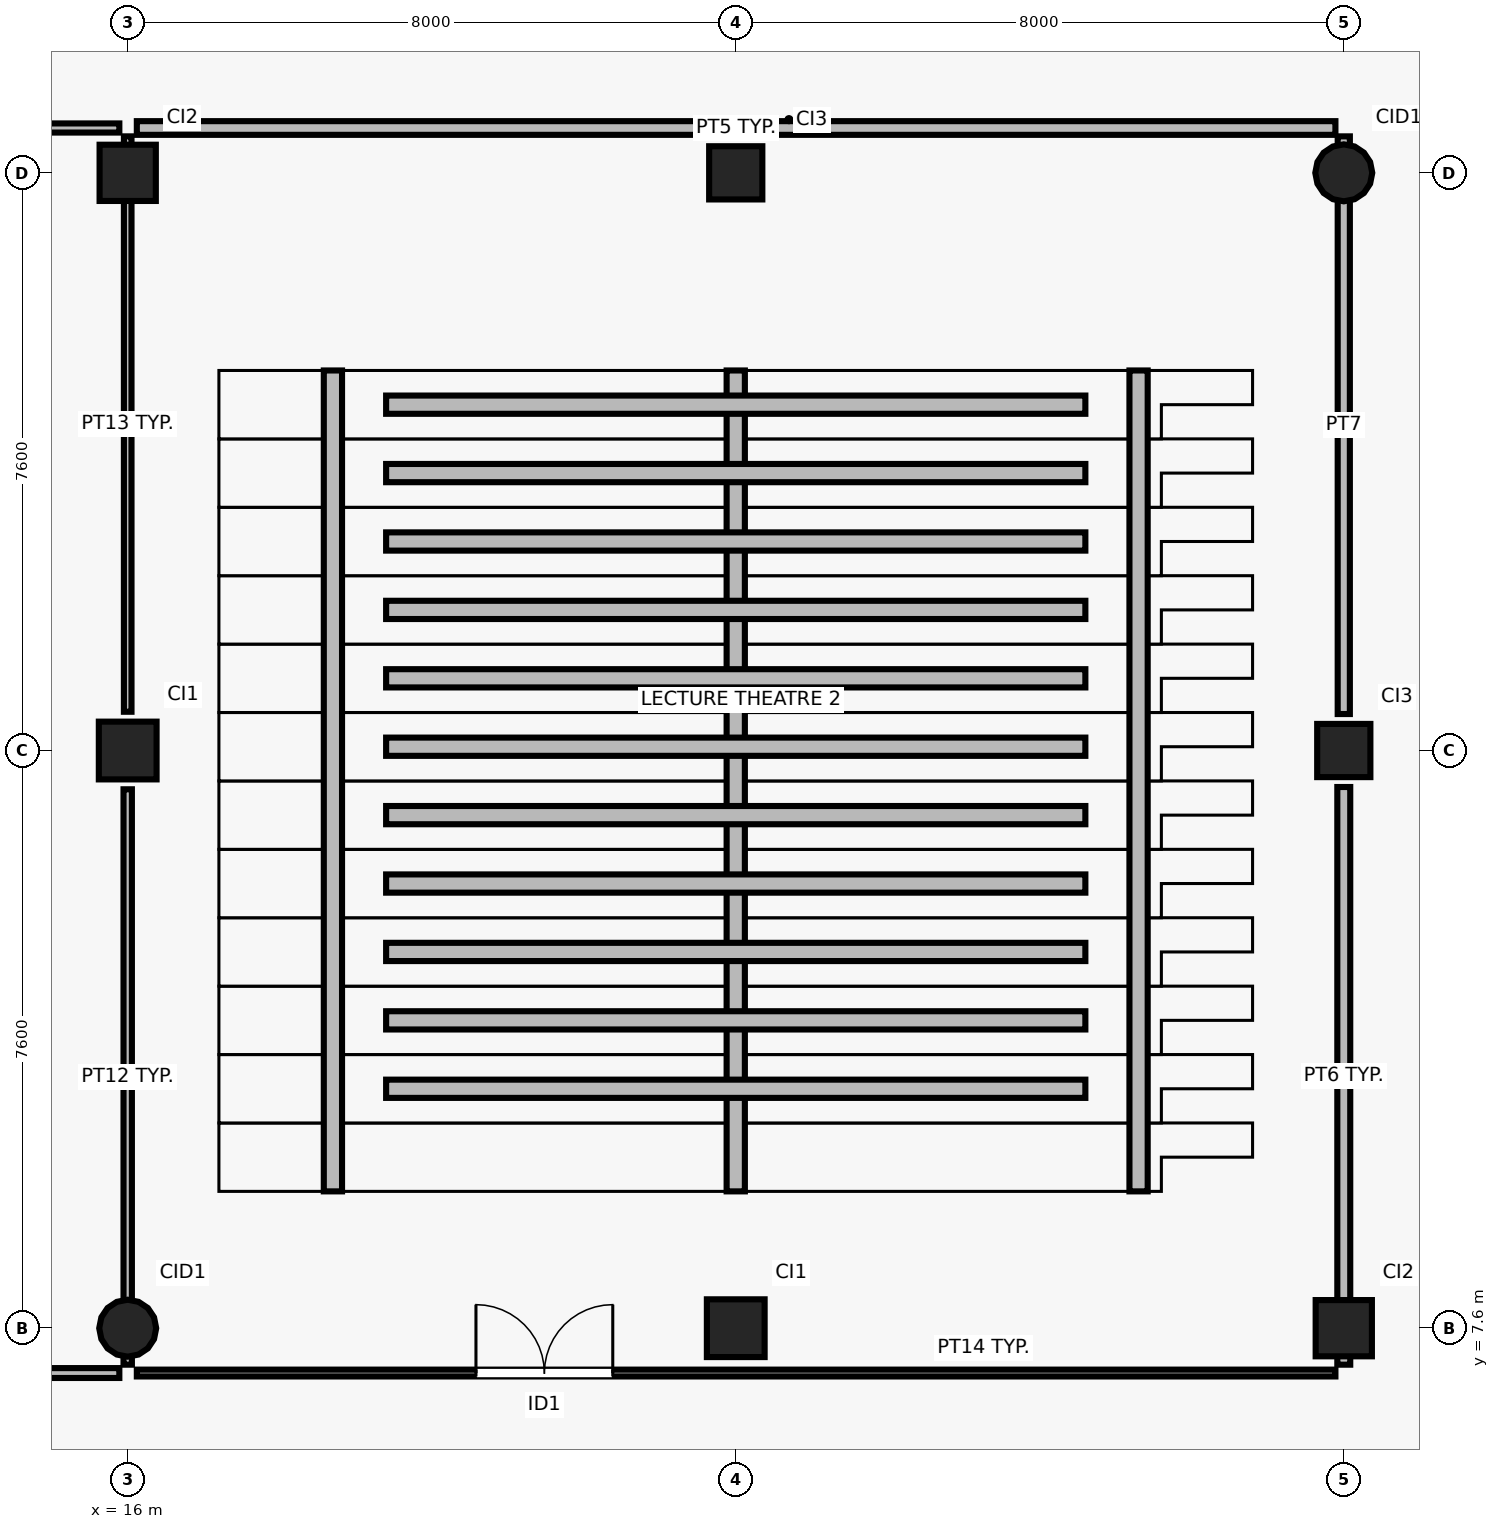
"""IFC4 building model, lengths in metres.
Left out: names, types, materials, properties, quantities, classifications, styles, units other than length and angle.
Written with IfcOpenShell. Run it as: python <this file> out.ifc"""

import sys

from ifc_helpers import new_model, si_unit, direction, frame, frame_2d, origin, origin_2d, place, context, subcontext, project, spatial, polyline, rectangle, circle, outline, extrude, element, fill, save


model = new_model("IFC4")
c1 = context("Model", 3, precision=1e-05, world=origin(), true_north=direction((0.0, 1.0)))
c2 = subcontext(c1, "Body", "Model", "MODEL_VIEW")
j1 = project(units=[si_unit("LENGTHUNIT", "METRE"), si_unit("PLANEANGLEUNIT", "RADIAN")], contexts=[c1])
p1 = place(None, origin())
s1 = spatial("IfcSite", under=j1, at=p1, CompositionType="ELEMENT")
p2 = place(p1, origin())
s2 = spatial("IfcBuilding", under=s1, at=p2, CompositionType="ELEMENT")
p3 = place(p2, origin())
s3 = spatial("IfcBuildingStorey", under=s2, at=p3, CompositionType="ELEMENT", Elevation=0.0)
p4 = place(p3, frame((16.0, 7.6, 0.0), z_axis=(0.0, 0.0, 1.0), x_axis=(1.0, 0.0, 0.0)))
e1 = element("IfcColumn", 1, at=p4, inside=s3, PredefinedType="COLUMN", context=c2, shape_type="SweptSolid", body=[
    extrude(circle(Radius=0.375, at=origin_2d()), origin(), (0.0, 0.0, 1.0), 4.5),
])
p5 = place(p3, frame((16.0, 15.2, 0.0), z_axis=(0.0, 0.0, 1.0), x_axis=(1.0, 0.0, 0.0)))
e2 = element("IfcColumn", 2, at=p5, inside=s3, PredefinedType="COLUMN", context=c2, shape_type="SweptSolid", body=[
    extrude(rectangle(XDim=0.76, YDim=0.76, at=origin_2d()), origin(), (0.0, 0.0, 1.0), 4.5),
])
p6 = place(p3, frame((16.0, 22.8, 0.0), z_axis=(0.0, 0.0, 1.0), x_axis=(1.0, 0.0, 0.0)))
e3 = element("IfcColumn", 3, at=p6, inside=s3, PredefinedType="COLUMN", context=c2, shape_type="SweptSolid", body=[
    extrude(rectangle(XDim=0.74, YDim=0.74, at=origin_2d()), origin(), (0.0, 0.0, 1.0), 4.5),
])
p7 = place(p3, frame((24.0, 7.6, 0.0), z_axis=(0.0, 0.0, 1.0), x_axis=(1.0, 0.0, 0.0)))
e4 = element("IfcColumn", 4, at=p7, inside=s3, PredefinedType="COLUMN", context=c2, shape_type="SweptSolid", body=[
    extrude(rectangle(XDim=0.76, YDim=0.76, at=origin_2d()), origin(), (0.0, 0.0, 1.0), 4.5),
])
p8 = place(p3, frame((24.0, 22.8, 0.0), z_axis=(0.0, 0.0, 1.0), x_axis=(1.0, 0.0, 0.0)))
e5 = element("IfcColumn", 5, at=p8, inside=s3, PredefinedType="COLUMN", context=c2, shape_type="SweptSolid", body=[
    extrude(rectangle(XDim=0.7, YDim=0.7, at=origin_2d()), origin(), (0.0, 0.0, 1.0), 4.5),
])
p9 = place(p3, frame((32.0, 7.6, 0.0), z_axis=(0.0, 0.0, 1.0), x_axis=(1.0, 0.0, 0.0)))
e6 = element("IfcColumn", 6, at=p9, inside=s3, PredefinedType="COLUMN", context=c2, shape_type="SweptSolid", body=[
    extrude(rectangle(XDim=0.74, YDim=0.74, at=origin_2d()), origin(), (0.0, 0.0, 1.0), 4.5),
])
p10 = place(p3, frame((32.0, 15.2, 0.0), z_axis=(0.0, 0.0, 1.0), x_axis=(1.0, 0.0, 0.0)))
e7 = element("IfcColumn", 7, at=p10, inside=s3, PredefinedType="COLUMN", context=c2, shape_type="SweptSolid", body=[
    extrude(rectangle(XDim=0.7, YDim=0.7, at=origin_2d()), origin(), (0.0, 0.0, 1.0), 4.5),
])
p11 = place(p3, frame((32.0, 22.8, 0.0), z_axis=(0.0, 0.0, 1.0), x_axis=(1.0, 0.0, 0.0)))
e8 = element("IfcColumn", 8, at=p11, inside=s3, PredefinedType="COLUMN", context=c2, shape_type="SweptSolid", body=[
    extrude(circle(Radius=0.375, at=origin_2d()), origin(), (0.0, 0.0, 1.0), 4.5),
])
for number, where, z_axis, x_axis in (
    (9, (18.7, 9.4, 0.0), (0.0, 0.0, 1.0), (0.0, 1.0, 0.0)),
    (10, (24.0, 9.4, 0.0), (0.0, 0.0, 1.0), (0.0, 1.0, 0.0)),
    (11, (29.3, 9.4, 0.0), (0.0, 0.0, 1.0), (0.0, 1.0, 0.0)),
):
    element("IfcWall", number, at=place(p3, frame(where, z_axis=z_axis, x_axis=x_axis)), inside=s3, PredefinedType="SOLIDWALL", context=c2, shape_type="SweptSolid", body=[
        extrude(outline(polyline([(0.0, 0.0), (10.8, 0.0), (10.8, 1.625), (0.0, 0.05), (0.0, 0.0)])), frame((0.0, 0.12, 0.0), z_axis=(0.0, -1.0, 0.0), x_axis=(1.0, 0.0, 0.0)), (0.0, 0.0, 1.0), 0.24),
    ])
p12 = place(p3, frame((19.4, 10.75, 0.0), z_axis=(0.0, 0.0, 1.0), x_axis=(1.0, 0.0, 0.0)))
e12 = element("IfcWall", 12, at=p12, inside=s3, PredefinedType="SOLIDWALL", context=c2, shape_type="SweptSolid", body=[
    extrude(rectangle(XDim=9.2, YDim=0.24, at=frame_2d((4.6, 0.0))), origin(), (0.0, 0.0, 1.0), 0.125),
])
p13 = place(p3, frame((19.4, 11.65, 0.0), z_axis=(0.0, 0.0, 1.0), x_axis=(1.0, 0.0, 0.0)))
e13 = element("IfcWall", 13, at=p13, inside=s3, PredefinedType="SOLIDWALL", context=c2, shape_type="SweptSolid", body=[
    extrude(rectangle(XDim=9.2, YDim=0.24, at=frame_2d((4.6, 0.0))), origin(), (0.0, 0.0, 1.0), 0.275),
])
p14 = place(p3, frame((19.4, 12.55, 0.0), z_axis=(0.0, 0.0, 1.0), x_axis=(1.0, 0.0, 0.0)))
e14 = element("IfcWall", 14, at=p14, inside=s3, PredefinedType="SOLIDWALL", context=c2, shape_type="SweptSolid", body=[
    extrude(rectangle(XDim=9.2, YDim=0.24, at=frame_2d((4.6, 0.0))), origin(), (0.0, 0.0, 1.0), 0.425),
])
p15 = place(p3, frame((19.4, 13.45, 0.0), z_axis=(0.0, 0.0, 1.0), x_axis=(1.0, 0.0, 0.0)))
e15 = element("IfcWall", 15, at=p15, inside=s3, PredefinedType="SOLIDWALL", context=c2, shape_type="SweptSolid", body=[
    extrude(rectangle(XDim=9.2, YDim=0.24, at=frame_2d((4.6, 0.0))), origin(), (0.0, 0.0, 1.0), 0.575),
])
p16 = place(p3, frame((19.4, 14.35, 0.0), z_axis=(0.0, 0.0, 1.0), x_axis=(1.0, 0.0, 0.0)))
e16 = element("IfcWall", 16, at=p16, inside=s3, PredefinedType="SOLIDWALL", context=c2, shape_type="SweptSolid", body=[
    extrude(rectangle(XDim=9.2, YDim=0.24, at=frame_2d((4.6, 0.0))), origin(), (0.0, 0.0, 1.0), 0.725),
])
p17 = place(p3, frame((19.4, 15.25, 0.0), z_axis=(0.0, 0.0, 1.0), x_axis=(1.0, 0.0, 0.0)))
e17 = element("IfcWall", 17, at=p17, inside=s3, PredefinedType="SOLIDWALL", context=c2, shape_type="SweptSolid", body=[
    extrude(rectangle(XDim=9.2, YDim=0.24, at=frame_2d((4.6, 0.0))), origin(), (0.0, 0.0, 1.0), 0.875),
])
p18 = place(p3, frame((19.4, 16.15, 0.0), z_axis=(0.0, 0.0, 1.0), x_axis=(1.0, 0.0, 0.0)))
e18 = element("IfcWall", 18, at=p18, inside=s3, PredefinedType="SOLIDWALL", context=c2, shape_type="SweptSolid", body=[
    extrude(rectangle(XDim=9.2, YDim=0.24, at=frame_2d((4.6, 0.0))), origin(), (0.0, 0.0, 1.0), 1.025),
])
p19 = place(p3, frame((19.4, 17.05, 0.0), z_axis=(0.0, 0.0, 1.0), x_axis=(1.0, 0.0, 0.0)))
e19 = element("IfcWall", 19, at=p19, inside=s3, PredefinedType="SOLIDWALL", context=c2, shape_type="SweptSolid", body=[
    extrude(rectangle(XDim=9.2, YDim=0.24, at=frame_2d((4.6, 0.0))), origin(), (0.0, 0.0, 1.0), 1.175),
])
p20 = place(p3, frame((19.4, 17.95, 0.0), z_axis=(0.0, 0.0, 1.0), x_axis=(1.0, 0.0, 0.0)))
e20 = element("IfcWall", 20, at=p20, inside=s3, PredefinedType="SOLIDWALL", context=c2, shape_type="SweptSolid", body=[
    extrude(rectangle(XDim=9.2, YDim=0.24, at=frame_2d((4.6, 0.0))), origin(), (0.0, 0.0, 1.0), 1.325),
])
p21 = place(p3, frame((19.4, 18.85, 0.0), z_axis=(0.0, 0.0, 1.0), x_axis=(1.0, 0.0, 0.0)))
e21 = element("IfcWall", 21, at=p21, inside=s3, PredefinedType="SOLIDWALL", context=c2, shape_type="SweptSolid", body=[
    extrude(rectangle(XDim=9.2, YDim=0.24, at=frame_2d((4.6, 0.0))), origin(), (0.0, 0.0, 1.0), 1.475),
])
p22 = place(p3, frame((19.4, 19.75, 0.0), z_axis=(0.0, 0.0, 1.0), x_axis=(1.0, 0.0, 0.0)))
e22 = element("IfcWall", 22, at=p22, inside=s3, PredefinedType="SOLIDWALL", context=c2, shape_type="SweptSolid", body=[
    extrude(rectangle(XDim=9.2, YDim=0.24, at=frame_2d((4.6, 0.0))), origin(), (0.0, 0.0, 1.0), 1.625),
])
p23 = place(p3, frame((0.11, 7.01, 0.0), z_axis=(0.0, 0.0, 1.0), x_axis=(1.0, 0.0, 0.0)))
e23 = element("IfcWall", 23, at=p23, inside=s3, PredefinedType="PARTITIONING", context=c2, shape_type="SweptSolid", body=[
    extrude(rectangle(XDim=15.78, YDim=0.13, at=frame_2d((7.89, 0.0))), origin(), (0.0, 0.0, 1.0), 4.2),
])
p24 = place(p23, frame((4.515, 0.0, 0.0)))
e24 = element("IfcOpeningElement", 24, at=p24, cuts=e23, PredefinedType="OPENING", context=c2, shape_type="SweptSolid", body=[
    extrude(rectangle(XDim=1.7, YDim=2.3, at=frame_2d((0.85, 1.15))), frame((0.0, 0.075, 0.0), z_axis=(0.0, -1.0, 0.0), x_axis=(1.0, 0.0, 0.0)), (0.0, 0.0, 1.0), 0.15),
])
p25 = place(p3, frame((0.11, 23.39, 0.0), z_axis=(0.0, 0.0, 1.0), x_axis=(1.0, 0.0, 0.0)))
e25 = element("IfcWall", 25, at=p25, inside=s3, PredefinedType="PARTITIONING", context=c2, shape_type="SweptSolid", body=[
    extrude(rectangle(XDim=15.78, YDim=0.12, at=frame_2d((7.89, 0.0))), origin(), (0.0, 0.0, 1.0), 4.2),
])
p26 = place(p3, frame((16.0, 7.12, 0.0), z_axis=(0.0, 0.0, 1.0), x_axis=(0.0, 1.0, 0.0)))
e26 = element("IfcWall", 26, at=p26, inside=s3, PredefinedType="PARTITIONING", context=c2, shape_type="SweptSolid", body=[
    extrude(rectangle(XDim=7.57, YDim=0.11, at=frame_2d((3.785, 0.0))), origin(), (0.0, 0.0, 1.0), 3.6),
])
p27 = place(p3, frame((16.0, 15.71, 0.0), z_axis=(0.0, 0.0, 1.0), x_axis=(0.0, 1.0, 0.0)))
e27 = element("IfcWall", 27, at=p27, inside=s3, PredefinedType="PARTITIONING", context=c2, shape_type="SweptSolid", body=[
    extrude(rectangle(XDim=7.57, YDim=0.1, at=frame_2d((3.785, 0.0))), origin(), (0.0, 0.0, 1.0), 3.64),
])
p28 = place(p3, frame((16.12, 7.01, 0.0), z_axis=(0.0, 0.0, 1.0), x_axis=(1.0, 0.0, 0.0)))
e28 = element("IfcWall", 28, at=p28, inside=s3, PredefinedType="PARTITIONING", context=c2, shape_type="SweptSolid", body=[
    extrude(rectangle(XDim=15.77, YDim=0.09, at=frame_2d((7.885, 0.0))), origin(), (0.0, 0.0, 1.0), 4.2),
])
p29 = place(p28, frame((4.462, 0.0, 0.0)))
e29 = element("IfcOpeningElement", 29, at=p29, cuts=e28, PredefinedType="OPENING", context=c2, shape_type="SweptSolid", body=[
    extrude(rectangle(XDim=1.8, YDim=2.3, at=frame_2d((0.9, 1.15))), frame((0.0, 0.055, 0.0), z_axis=(0.0, -1.0, 0.0), x_axis=(1.0, 0.0, 0.0)), (0.0, 0.0, 1.0), 0.11),
])
p30 = place(p3, frame((16.12, 23.39, 0.0), z_axis=(0.0, 0.0, 1.0), x_axis=(1.0, 0.0, 0.0)))
e30 = element("IfcWall", 30, at=p30, inside=s3, PredefinedType="PARTITIONING", context=c2, shape_type="SweptSolid", body=[
    extrude(rectangle(XDim=15.77, YDim=0.18, at=frame_2d((7.885, 0.0))), origin(), (0.0, 0.0, 1.0), 4.2),
])
p31 = place(p3, frame((32.0, 7.12, 0.0), z_axis=(0.0, 0.0, 1.0), x_axis=(0.0, 1.0, 0.0)))
e31 = element("IfcWall", 31, at=p31, inside=s3, PredefinedType="PARTITIONING", context=c2, shape_type="SweptSolid", body=[
    extrude(rectangle(XDim=7.6, YDim=0.17, at=frame_2d((3.8, 0.0))), origin(), (0.0, 0.0, 1.0), 3.54),
])
p32 = place(p3, frame((32.0, 15.68, 0.0), z_axis=(0.0, 0.0, 1.0), x_axis=(0.0, 1.0, 0.0)))
e32 = element("IfcWall", 32, at=p32, inside=s3, PredefinedType="PARTITIONING", context=c2, shape_type="SweptSolid", body=[
    extrude(rectangle(XDim=7.6, YDim=0.16, at=frame_2d((3.8, 0.0))), origin(), (0.0, 0.0, 1.0), 3.6),
])
p33 = place(p29, origin())
e33 = element("IfcDoor", 33, at=p33, inside=s3, OperationType="DOUBLE_DOOR_SINGLE_SWING", PredefinedType="DOOR", context=c2, shape_type="SweptSolid", body=[
    extrude(rectangle(XDim=1.8, YDim=2.3, at=frame_2d((0.9, 1.15))), frame((0.0, 0.025, 0.0), z_axis=(0.0, -1.0, 0.0), x_axis=(1.0, 0.0, 0.0)), (0.0, 0.0, 1.0), 0.05),
])
fill(e29, e33)
save(model, sys.argv[1])
